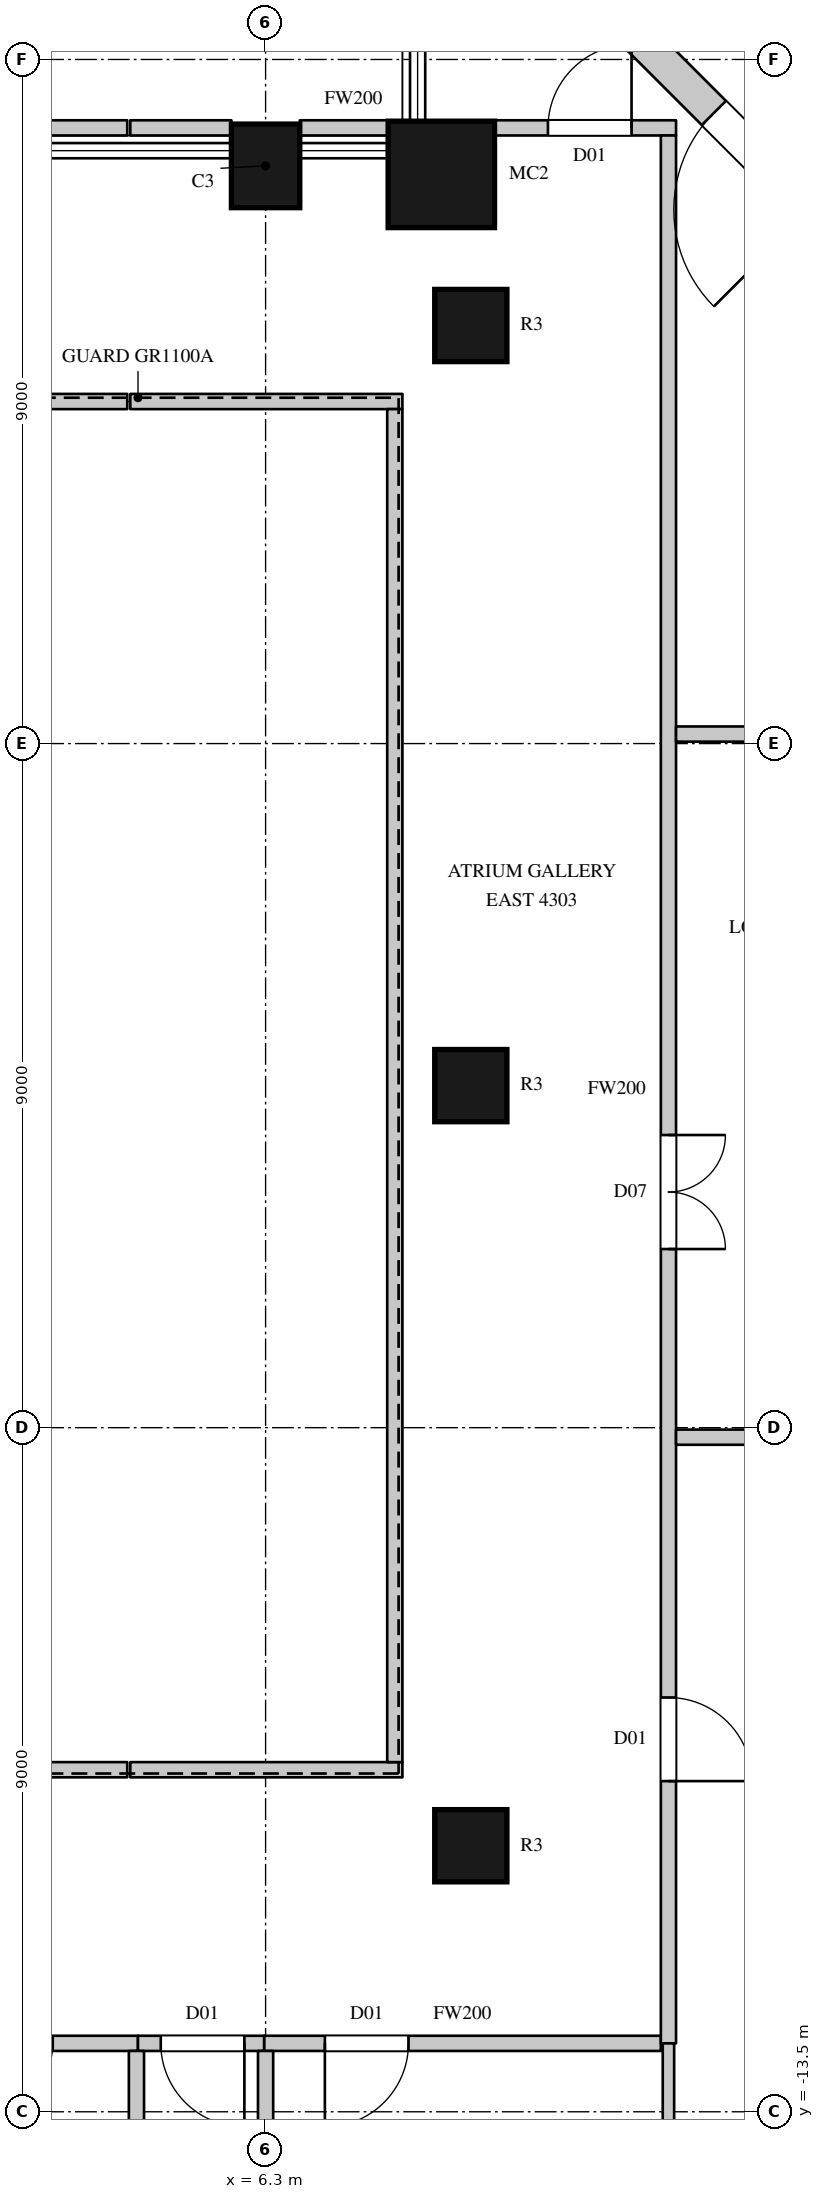
"""IFC4 building model, lengths in metres.
Left out: names, types, materials, properties, quantities, classifications, styles, units other than length and angle.
Written with IfcOpenShell. Run it as: python <this file> out.ifc"""

import sys

from ifc_helpers import new_model, si_unit, direction, frame, frame_2d, origin, origin_2d, place, context, subcontext, project, spatial, rectangle, circle, extrude, element, fill, save


model = new_model("IFC4")
c1 = context("Model", 3, precision=1e-05, world=origin(), true_north=direction((0.0, 1.0)))
c2 = subcontext(c1, "Body", "Model", "MODEL_VIEW")
j1 = project(units=[si_unit("LENGTHUNIT", "METRE"), si_unit("PLANEANGLEUNIT", "RADIAN")], contexts=[c1])
p1 = place(None, origin())
s1 = spatial("IfcSite", under=j1, at=p1, CompositionType="ELEMENT")
p2 = place(p1, origin())
s2 = spatial("IfcBuilding", under=s1, at=p2, CompositionType="ELEMENT")
p3 = place(p2, frame((0.0, 0.0, 197.4)))
s3 = spatial("IfcBuildingStorey", under=s2, at=p3, CompositionType="ELEMENT", Elevation=197.4)
p4 = place(p3, frame((8.612, 11.988, 0.0), z_axis=(0.0, 0.0, 1.0), x_axis=(1.0, 0.0, 0.0)))
e1 = element("IfcColumn", 1, at=p4, inside=s3, PredefinedType="COLUMN", context=c2, shape_type="SweptSolid", body=[
    extrude(circle(Radius=0.7, at=origin_2d()), origin(), (0.0, 0.0, 1.0), 4.1),
])
p5 = place(p3, frame((6.3, 12.1, 0.0), z_axis=(0.0, 0.0, 1.0), x_axis=(-1.0, 0.0, 0.0)))
e2 = element("IfcColumn", 2, at=p5, inside=s3, PredefinedType="COLUMN", context=c2, shape_type="SweptSolid", body=[
    extrude(rectangle(XDim=0.9, YDim=1.1, at=origin_2d()), origin(), (0.0, 0.0, 1.0), 4.1),
])
for number, where, z_axis, x_axis in (
    (3, (9.0, -10.0, 0.0), (0.0, 0.0, 1.0), (1.0, 0.0, 0.0)),
    (4, (9.0, 0.0, 0.0), (0.0, 0.0, 1.0), (1.0, 0.0, 0.0)),
    (5, (9.0, 10.0, 0.0), (0.0, 0.0, 1.0), (1.0, 0.0, 0.0)),
):
    element("IfcColumn", number, at=place(p3, frame(where, z_axis=z_axis, x_axis=x_axis)), inside=s3, PredefinedType="COLUMN", context=c2, shape_type="SweptSolid", body=[
        extrude(circle(Radius=0.475, at=origin_2d()), origin(), (0.0, 0.0, 1.0), 4.1),
    ])
p6 = place(p3, frame((13.941, 11.053, 0.0), z_axis=(0.0, 0.0, 1.0), x_axis=(-0.707106781187, 0.707106781187, 0.0)))
e6 = element("IfcWall", 6, at=p6, inside=s3, PredefinedType="SOLIDWALL", context=c2, shape_type="SweptSolid", body=[
    extrude(rectangle(XDim=6.505, YDim=0.45, at=frame_2d((3.252, 0.0))), origin(), (0.0, 0.0, 1.0), 3.8),
])
p7 = place(p6, frame((0.665, 0.0, 0.0)))
e7 = element("IfcOpeningElement", 7, at=p7, cuts=e6, PredefinedType="OPENING", context=c2, shape_type="SweptSolid", body=[
    extrude(rectangle(XDim=1.8, YDim=2.4, at=frame_2d((0.9, 1.2))), frame((0.0, 0.235, 0.0), z_axis=(0.0, -1.0, 0.0), x_axis=(1.0, 0.0, 0.0)), (0.0, 0.0, 1.0), 0.47),
])
p8 = place(p3, frame((-10.9, -12.6, 0.0), z_axis=(0.0, 0.0, 1.0), x_axis=(1.0, 0.0, 0.0)))
e8 = element("IfcWall", 8, at=p8, inside=s3, PredefinedType="PARTITIONING", context=c2, shape_type="SweptSolid", body=[
    extrude(rectangle(XDim=15.521, YDim=0.2, at=frame_2d((7.76, 0.0))), origin(), (0.0, 0.0, 1.0), 3.8),
])
p9 = place(p8, frame((0.95, 0.0, 0.0)))
e9 = element("IfcOpeningElement", 9, at=p9, cuts=e8, PredefinedType="OPENING", context=c2, shape_type="SweptSolid", body=[
    extrude(rectangle(XDim=0.9, YDim=2.2, at=frame_2d((0.45, 1.1))), frame((0.0, 0.11, 0.0), z_axis=(0.0, -1.0, 0.0), x_axis=(1.0, 0.0, 0.0)), (0.0, 0.0, 1.0), 0.22),
])
p10 = place(p8, frame((3.95, 0.0, 0.0)))
e10 = element("IfcOpeningElement", 10, at=p10, cuts=e8, PredefinedType="OPENING", context=c2, shape_type="SweptSolid", body=[
    extrude(rectangle(XDim=0.9, YDim=2.2, at=frame_2d((0.45, 1.1))), frame((0.0, 0.11, 0.0), z_axis=(0.0, -1.0, 0.0), x_axis=(1.0, 0.0, 0.0)), (0.0, 0.0, 1.0), 0.22),
])
p11 = place(p8, frame((7.1, 0.0, 0.0)))
e11 = element("IfcOpeningElement", 11, at=p11, cuts=e8, PredefinedType="OPENING", context=c2, shape_type="SweptSolid", body=[
    extrude(rectangle(XDim=0.9, YDim=2.2, at=frame_2d((0.45, 1.1))), frame((0.0, 0.11, 0.0), z_axis=(0.0, -1.0, 0.0), x_axis=(1.0, 0.0, 0.0)), (0.0, 0.0, 1.0), 0.22),
])
p12 = place(p8, frame((10.0, 0.0, 0.0)))
e12 = element("IfcOpeningElement", 12, at=p12, cuts=e8, PredefinedType="OPENING", context=c2, shape_type="SweptSolid", body=[
    extrude(rectangle(XDim=0.9, YDim=2.2, at=frame_2d((0.45, 1.1))), frame((0.0, 0.11, 0.0), z_axis=(0.0, -1.0, 0.0), x_axis=(1.0, 0.0, 0.0)), (0.0, 0.0, 1.0), 0.22),
])
p13 = place(p8, frame((13.5, 0.0, 0.0)))
e13 = element("IfcOpeningElement", 13, at=p13, cuts=e8, PredefinedType="OPENING", context=c2, shape_type="SweptSolid", body=[
    extrude(rectangle(XDim=0.9, YDim=2.2, at=frame_2d((0.45, 1.1))), frame((0.0, 0.11, 0.0), z_axis=(0.0, -1.0, 0.0), x_axis=(1.0, 0.0, 0.0)), (0.0, 0.0, 1.0), 0.22),
])
p14 = place(p3, frame((-2.25, 12.6, 0.0), z_axis=(0.0, 0.0, 1.0), x_axis=(1.0, 0.0, 0.0)))
e14 = element("IfcWall", 14, at=p14, inside=s3, PredefinedType="PARTITIONING", context=c2, shape_type="SweptSolid", body=[
    extrude(rectangle(XDim=6.73, YDim=0.2, at=frame_2d((3.365, 0.0))), origin(), (0.0, 0.0, 1.0), 3.8),
])
for number, where, z_axis, x_axis in (
    (15, (-6.1, -9.0, 0.0), (0.0, 0.0, 1.0), (1.0, 0.0, 0.0)),
    (16, (-6.1, 9.0, 0.0), (0.0, 0.0, 1.0), (1.0, 0.0, 0.0)),
):
    element("IfcWall", number, at=place(p3, frame(where, z_axis=z_axis, x_axis=x_axis)), inside=s3, PredefinedType="PARTITIONING", context=c2, shape_type="SweptSolid", body=[
        extrude(rectangle(XDim=10.58, YDim=0.2, at=frame_2d((5.29, 0.0))), origin(), (0.0, 0.0, 1.0), 3.8),
    ])
for number, where, z_axis, x_axis in (
    (17, (4.52, -9.0, 0.0), (0.0, 0.0, 1.0), (1.0, 0.0, 0.0)),
    (18, (4.52, 9.0, 0.0), (0.0, 0.0, 1.0), (1.0, 0.0, 0.0)),
):
    element("IfcWall", number, at=place(p3, frame(where, z_axis=z_axis, x_axis=x_axis)), inside=s3, PredefinedType="PARTITIONING", context=c2, shape_type="SweptSolid", body=[
        extrude(rectangle(XDim=3.58, YDim=0.2, at=frame_2d((1.79, 0.0))), origin(), (0.0, 0.0, 1.0), 3.8),
    ])
p15 = place(p3, frame((4.52, 12.6, 0.0), z_axis=(0.0, 0.0, 1.0), x_axis=(1.0, 0.0, 0.0)))
e19 = element("IfcWall", 19, at=p15, inside=s3, PredefinedType="PARTITIONING", context=c2, shape_type="SweptSolid", body=[
    extrude(rectangle(XDim=1.33, YDim=0.2, at=frame_2d((0.665, 0.0))), origin(), (0.0, 0.0, 1.0), 3.8),
])
p16 = place(p3, frame((6.75, 12.6, 0.0), z_axis=(0.0, 0.0, 1.0), x_axis=(1.0, 0.0, 0.0)))
e20 = element("IfcWall", 20, at=p16, inside=s3, PredefinedType="PARTITIONING", context=c2, shape_type="SweptSolid", body=[
    extrude(rectangle(XDim=1.41, YDim=0.2, at=frame_2d((0.705, 0.0))), origin(), (0.0, 0.0, 1.0), 3.8),
])
p17 = place(p3, frame((6.28, -12.6, 0.0), z_axis=(0.0, 0.0, 1.0), x_axis=(1.0, 0.0, 0.0)))
e21 = element("IfcWall", 21, at=p17, inside=s3, PredefinedType="PARTITIONING", context=c2, shape_type="SweptSolid", body=[
    extrude(rectangle(XDim=5.22, YDim=0.2, at=frame_2d((2.61, 0.0))), origin(), (0.0, 0.0, 1.0), 3.8),
])
p18 = place(p17, frame((0.8, 0.0, 0.0)))
e22 = element("IfcOpeningElement", 22, at=p18, cuts=e21, PredefinedType="OPENING", context=c2, shape_type="SweptSolid", body=[
    extrude(rectangle(XDim=1.1, YDim=2.4, at=frame_2d((0.55, 1.2))), frame((0.0, 0.11, 0.0), z_axis=(0.0, -1.0, 0.0), x_axis=(1.0, 0.0, 0.0)), (0.0, 0.0, 1.0), 0.22),
])
p19 = place(p3, frame((8.0, -8.9, 0.0), z_axis=(0.0, 0.0, 1.0), x_axis=(0.0, 1.0, 0.0)))
e23 = element("IfcWall", 23, at=p19, inside=s3, PredefinedType="PARTITIONING", context=c2, shape_type="SweptSolid", body=[
    extrude(rectangle(XDim=17.8, YDim=0.2, at=frame_2d((8.9, 0.0))), origin(), (0.0, 0.0, 1.0), 3.8),
])
p20 = place(p3, frame((9.065, 12.6, 0.0), z_axis=(0.0, 0.0, 1.0), x_axis=(1.0, 0.0, 0.0)))
e24 = element("IfcWall", 24, at=p20, inside=s3, PredefinedType="PARTITIONING", context=c2, shape_type="SweptSolid", body=[
    extrude(rectangle(XDim=2.635, YDim=0.2, at=frame_2d((1.318, 0.0))), origin(), (0.0, 0.0, 1.0), 3.8),
])
p21 = place(p20, frame((0.95, 0.0, 0.0)))
e25 = element("IfcOpeningElement", 25, at=p21, cuts=e24, PredefinedType="OPENING", context=c2, shape_type="SweptSolid", body=[
    extrude(rectangle(XDim=1.1, YDim=2.4, at=frame_2d((0.55, 1.2))), frame((0.0, 0.11, 0.0), z_axis=(0.0, -1.0, 0.0), x_axis=(1.0, 0.0, 0.0)), (0.0, 0.0, 1.0), 0.22),
])
p22 = place(p3, frame((11.6, -12.6, 0.0), z_axis=(0.0, 0.0, 1.0), x_axis=(0.0, 1.0, 0.0)))
e26 = element("IfcWall", 26, at=p22, inside=s3, PredefinedType="PARTITIONING", context=c2, shape_type="SweptSolid", body=[
    extrude(rectangle(XDim=25.1, YDim=0.2, at=frame_2d((12.55, 0.0))), origin(), (0.0, 0.0, 1.0), 3.8),
])
p23 = place(p22, frame((10.45, 0.0, 0.0)))
e27 = element("IfcOpeningElement", 27, at=p23, cuts=e26, PredefinedType="OPENING", context=c2, shape_type="SweptSolid", body=[
    extrude(rectangle(XDim=1.5, YDim=2.4, at=frame_2d((0.75, 1.2))), frame((0.0, 0.11, 0.0), z_axis=(0.0, -1.0, 0.0), x_axis=(1.0, 0.0, 0.0)), (0.0, 0.0, 1.0), 0.22),
])
p24 = place(p22, frame((3.45, 0.0, 0.0)))
e28 = element("IfcOpeningElement", 28, at=p24, cuts=e26, PredefinedType="OPENING", context=c2, shape_type="SweptSolid", body=[
    extrude(rectangle(XDim=1.1, YDim=2.4, at=frame_2d((0.55, 1.2))), frame((0.0, 0.11, 0.0), z_axis=(0.0, -1.0, 0.0), x_axis=(1.0, 0.0, 0.0)), (0.0, 0.0, 1.0), 0.22),
])
for number, where, z_axis, x_axis in (
    (29, (11.7, -4.625, 0.0), (0.0, 0.0, 1.0), (1.0, 0.0, 0.0)),
    (30, (11.7, 4.625, 0.0), (0.0, 0.0, 1.0), (1.0, 0.0, 0.0)),
):
    element("IfcWall", number, at=place(p3, frame(where, z_axis=z_axis, x_axis=x_axis)), inside=s3, PredefinedType="PARTITIONING", context=c2, shape_type="SweptSolid", body=[
        extrude(rectangle(XDim=2.975, YDim=0.2, at=frame_2d((1.488, 0.0))), origin(), (0.0, 0.0, 1.0), 3.8),
    ])
p25 = place(p3, frame((11.6, -16.7, 0.0), z_axis=(0.0, 0.0, 1.0), x_axis=(0.0, 1.0, 0.0)))
e31 = element("IfcWall", 31, at=p25, inside=s3, PredefinedType="PARTITIONING", context=c2, shape_type="SweptSolid", body=[
    extrude(rectangle(XDim=4.1, YDim=0.15, at=frame_2d((2.05, 0.0))), origin(), (0.0, 0.0, 1.0), 3.8),
])
p26 = place(p3, frame((4.621, -12.6, 0.0), z_axis=(0.0, 0.0, 1.0), x_axis=(1.0, 0.0, 0.0)))
e32 = element("IfcWall", 32, at=p26, inside=s3, PredefinedType="PARTITIONING", context=c2, shape_type="SweptSolid", body=[
    extrude(rectangle(XDim=1.659, YDim=0.2, at=frame_2d((0.83, 0.0))), origin(), (0.0, 0.0, 1.0), 3.8),
])
p27 = place(p26, frame((0.3, 0.0, 0.0)))
e33 = element("IfcOpeningElement", 33, at=p27, cuts=e32, PredefinedType="OPENING", context=c2, shape_type="SweptSolid", body=[
    extrude(rectangle(XDim=1.1, YDim=2.4, at=frame_2d((0.55, 1.2))), frame((0.0, 0.11, 0.0), z_axis=(0.0, -1.0, 0.0), x_axis=(1.0, 0.0, 0.0)), (0.0, 0.0, 1.0), 0.22),
])
p28 = place(p3, frame((4.601, -16.7, 0.0), z_axis=(0.0, 0.0, 1.0), x_axis=(0.0, 1.0, 0.0)))
e34 = element("IfcWall", 34, at=p28, inside=s3, PredefinedType="PARTITIONING", context=c2, shape_type="SweptSolid", body=[
    extrude(rectangle(XDim=4.0, YDim=0.2, at=frame_2d((2.0, 0.0))), origin(), (0.0, 0.0, 1.0), 3.8),
])
p29 = place(p3, frame((6.3, -16.05, 0.0), z_axis=(0.0, 0.0, 1.0), x_axis=(0.0, 1.0, 0.0)))
e35 = element("IfcWall", 35, at=p29, inside=s3, PredefinedType="PARTITIONING", context=c2, shape_type="SweptSolid", body=[
    extrude(rectangle(XDim=3.35, YDim=0.2, at=frame_2d((1.675, 0.0))), origin(), (0.0, 0.0, 1.0), 3.25),
])
p30 = place(p7, origin())
e36 = element("IfcDoor", 36, at=p30, inside=s3, OperationType="SLIDING_TO_LEFT", PredefinedType="DOOR", context=c2, shape_type="SweptSolid", body=[
    extrude(rectangle(XDim=1.8, YDim=2.4, at=frame_2d((0.9, 1.2))), frame((0.0, 0.13, 0.0), z_axis=(0.0, -1.0, 0.0), x_axis=(1.0, 0.0, 0.0)), (0.0, 0.0, 1.0), 0.05),
])
fill(e7, e36)
p31 = place(p23, origin())
e37 = element("IfcDoor", 37, at=p31, inside=s3, OperationType="DOUBLE_DOOR_SINGLE_SWING", PredefinedType="DOOR", context=c2, shape_type="SweptSolid", body=[
    extrude(rectangle(XDim=1.5, YDim=2.4, at=frame_2d((0.75, 1.2))), frame((0.0, 0.025, 0.0), z_axis=(0.0, -1.0, 0.0), x_axis=(1.0, 0.0, 0.0)), (0.0, 0.0, 1.0), 0.05),
])
fill(e27, e37)
p32 = place(p27, origin())
e38 = element("IfcDoor", 38, at=p32, inside=s3, OperationType="SINGLE_SWING_LEFT", PredefinedType="DOOR", context=c2, shape_type="SweptSolid", body=[
    extrude(rectangle(XDim=1.1, YDim=2.4, at=frame_2d((0.55, 1.2))), frame((0.0, 0.025, 0.0), z_axis=(0.0, -1.0, 0.0), x_axis=(1.0, 0.0, 0.0)), (0.0, 0.0, 1.0), 0.05),
])
fill(e33, e38)
p33 = place(p18, origin())
e39 = element("IfcDoor", 39, at=p33, inside=s3, OperationType="SINGLE_SWING_RIGHT", PredefinedType="DOOR", context=c2, shape_type="SweptSolid", body=[
    extrude(rectangle(XDim=1.1, YDim=2.4, at=frame_2d((0.55, 1.2))), frame((0.0, 0.025, 0.0), z_axis=(0.0, -1.0, 0.0), x_axis=(1.0, 0.0, 0.0)), (0.0, 0.0, 1.0), 0.05),
])
fill(e22, e39)
p34 = place(p21, origin())
e40 = element("IfcDoor", 40, at=p34, inside=s3, OperationType="SINGLE_SWING_RIGHT", PredefinedType="DOOR", context=c2, shape_type="SweptSolid", body=[
    extrude(rectangle(XDim=1.1, YDim=2.4, at=frame_2d((0.55, 1.2))), frame((0.0, 0.025, 0.0), z_axis=(0.0, -1.0, 0.0), x_axis=(1.0, 0.0, 0.0)), (0.0, 0.0, 1.0), 0.05),
])
fill(e25, e40)
p35 = place(p24, origin())
e41 = element("IfcDoor", 41, at=p35, inside=s3, OperationType="SINGLE_SWING_RIGHT", PredefinedType="DOOR", context=c2, shape_type="SweptSolid", body=[
    extrude(rectangle(XDim=1.1, YDim=2.4, at=frame_2d((0.55, 1.2))), frame((0.0, 0.025, 0.0), z_axis=(0.0, -1.0, 0.0), x_axis=(1.0, 0.0, 0.0)), (0.0, 0.0, 1.0), 0.05),
])
fill(e28, e41)
save(model, sys.argv[1])
